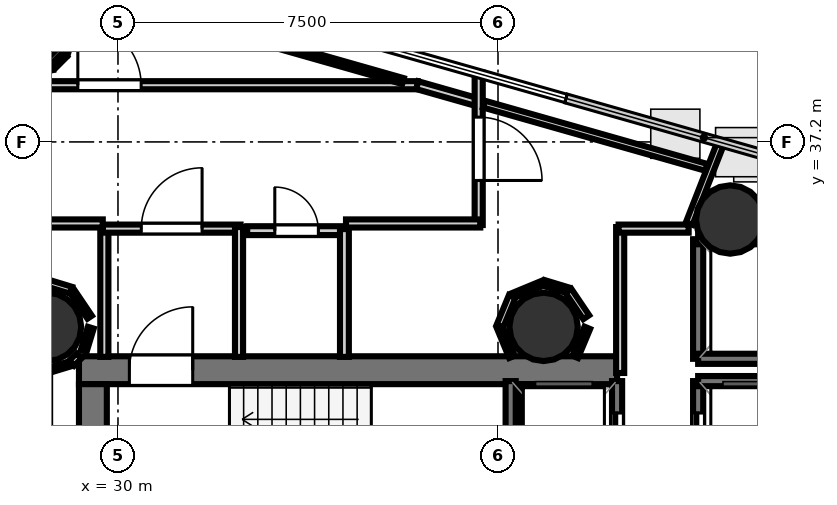
"""IFC4 building model, lengths in metres.
Left out: names, types, materials, properties, quantities, classifications, styles, units other than length and angle.
Written with IfcOpenShell. Run it as: python <this file> out.ifc"""

import sys

from ifc_helpers import new_model, si_unit, direction, frame, frame_2d, origin, origin_2d, place, context, subcontext, project, spatial, rectangle, hollow_circle, extrude, element, fill, save


model = new_model("IFC4")
c1 = context("Model", 3, precision=1e-05, world=origin(), true_north=direction((0.0, 1.0)))
c2 = subcontext(c1, "Body", "Model", "MODEL_VIEW")
j1 = project(units=[si_unit("LENGTHUNIT", "METRE"), si_unit("PLANEANGLEUNIT", "RADIAN")], contexts=[c1])
p1 = place(None, origin())
s1 = spatial("IfcSite", under=j1, at=p1, CompositionType="ELEMENT")
p2 = place(p1, origin())
s2 = spatial("IfcBuilding", under=s1, at=p2, CompositionType="ELEMENT")
p3 = place(p2, frame((0.0, 0.0, 180.9)))
s3 = spatial("IfcBuildingStorey", under=s2, at=p3, CompositionType="ELEMENT", Elevation=180.9)
p4 = place(p3, frame((29.23, 32.695, 0.0), z_axis=(0.0, 0.0, 1.0), x_axis=(1.0, 0.0, 0.0)))
e1 = element("IfcWall", 1, at=p4, inside=s3, PredefinedType="SHEAR", context=c2, shape_type="SweptSolid", body=[
    extrude(rectangle(XDim=10.62, YDim=0.55, at=frame_2d((5.31, 0.0))), origin(), (0.0, 0.0, 1.0), 3.4),
])
p5 = place(p4, frame((0.995, 0.0, 0.0)))
e2 = element("IfcOpeningElement", 2, at=p5, cuts=e1, PredefinedType="OPENING", context=c2, shape_type="SweptSolid", body=[
    extrude(rectangle(XDim=1.25, YDim=2.15, at=frame_2d((0.625, 1.075))), frame((0.0, 0.285, 0.0), z_axis=(0.0, -1.0, 0.0), x_axis=(1.0, 0.0, 0.0)), (0.0, 0.0, 1.0), 0.57),
])
p6 = place(p3, frame((29.505, 24.98, 0.0), z_axis=(0.0, 0.0, 1.0), x_axis=(0.0, 1.0, 0.0)))
e3 = element("IfcWall", 3, at=p6, inside=s3, PredefinedType="SHEAR", context=c2, shape_type="SweptSolid", body=[
    extrude(rectangle(XDim=7.44, YDim=0.55, at=frame_2d((3.72, 0.0))), origin(), (0.0, 0.0, 1.0), 3.4),
])
p7 = place(p3, frame((38.18, 24.98, 0.0), z_axis=(0.0, 0.0, 1.0), x_axis=(0.0, 1.0, 0.0)))
e4 = element("IfcWall", 4, at=p7, inside=s3, PredefinedType="SHEAR", context=c2, shape_type="SweptSolid", body=[
    extrude(rectangle(XDim=7.44, YDim=0.5, at=frame_2d((3.72, 0.0))), origin(), (0.0, 0.0, 1.0), 3.4),
])
for number, where, z_axis, x_axis in (
    (5, (28.6, 33.55, 0.0), (0.0, 0.0, 1.0), (1.0, 0.0, 0.0)),
    (6, (38.4, 33.55, 0.0), (0.0, 0.0, 1.0), (1.0, 0.0, 0.0)),
    (7, (42.083, 35.669, 0.0), (0.0, 0.0, 1.0), (1.0, 0.0, 0.0)),
    (8, (28.235, 39.411, 0.0), (0.0, 0.0, 1.0), (1.0, 0.0, 0.0)),
):
    element("IfcColumn", number, at=place(p3, frame(where, z_axis=z_axis, x_axis=x_axis)), inside=s3, PredefinedType="COLUMN", context=c2, shape_type="SweptSolid", body=[
        extrude(hollow_circle(Radius=0.675, WallThickness=0.032, at=origin_2d()), origin(), (0.0, 0.0, 1.0), 3.7),
    ])
p8 = place(p3, frame((39.85, 30.12, 0.0), z_axis=(0.0, 0.0, 1.0), x_axis=(0.0, 1.0, 0.0)))
e9 = element("IfcWall", 9, at=p8, inside=s3, PredefinedType="SOLIDWALL", context=c2, shape_type="SweptSolid", body=[
    extrude(rectangle(XDim=2.36, YDim=0.2, at=frame_2d((1.18, 0.0))), origin(), (0.0, 0.0, 1.0), 3.4),
])
p9 = place(p8, frame((0.63, 0.0, 0.0)))
e10 = element("IfcOpeningElement", 10, at=p9, cuts=e9, PredefinedType="OPENING", context=c2, shape_type="SweptSolid", body=[
    extrude(rectangle(XDim=1.1, YDim=2.15, at=frame_2d((0.55, 1.075))), frame((0.0, 0.11, 0.0), z_axis=(0.0, -1.0, 0.0), x_axis=(1.0, 0.0, 0.0)), (0.0, 0.0, 1.0), 0.22),
])
p10 = place(p3, frame((37.75, 30.12, 0.0), z_axis=(0.0, 0.0, 1.0), x_axis=(0.0, 1.0, 0.0)))
e11 = element("IfcWall", 11, at=p10, inside=s3, PredefinedType="SOLIDWALL", context=c2, shape_type="SweptSolid", body=[
    extrude(rectangle(XDim=2.36, YDim=0.2, at=frame_2d((1.18, 0.0))), origin(), (0.0, 0.0, 1.0), 3.4),
])
p11 = place(p3, frame((41.45, 30.12, 0.0), z_axis=(0.0, 0.0, 1.0), x_axis=(0.0, 1.0, 0.0)))
e12 = element("IfcWall", 12, at=p11, inside=s3, PredefinedType="SOLIDWALL", context=c2, shape_type="SweptSolid", body=[
    extrude(rectangle(XDim=2.36, YDim=0.2, at=frame_2d((1.18, 0.0))), origin(), (0.0, 0.0, 1.0), 3.4),
])
p12 = place(p11, frame((0.63, 0.0, 0.0)))
e13 = element("IfcOpeningElement", 13, at=p12, cuts=e12, PredefinedType="OPENING", context=c2, shape_type="SweptSolid", body=[
    extrude(rectangle(XDim=1.1, YDim=2.15, at=frame_2d((0.55, 1.075))), frame((0.0, 0.11, 0.0), z_axis=(0.0, -1.0, 0.0), x_axis=(1.0, 0.0, 0.0)), (0.0, 0.0, 1.0), 0.22),
])
p13 = place(p3, frame((41.45, 32.48, 0.0), z_axis=(0.0, 0.0, 1.0), x_axis=(1.0, 0.0, 0.0)))
e14 = element("IfcWall", 14, at=p13, inside=s3, PredefinedType="SOLIDWALL", context=c2, shape_type="SweptSolid", body=[
    extrude(rectangle(XDim=2.1, YDim=0.2, at=frame_2d((1.05, 0.0))), origin(), (0.0, 0.0, 1.0), 3.4),
])
p14 = place(p3, frame((41.45, 32.92, 0.0), z_axis=(0.0, 0.0, 1.0), x_axis=(0.0, 1.0, 0.0)))
e15 = element("IfcWall", 15, at=p14, inside=s3, PredefinedType="SOLIDWALL", context=c2, shape_type="SweptSolid", body=[
    extrude(rectangle(XDim=2.36, YDim=0.2, at=frame_2d((1.18, 0.0))), origin(), (0.0, 0.0, 1.0), 3.4),
])
for number, where, z_axis, x_axis in (
    (16, (41.45, 35.28, 0.0), (0.0, 0.0, 1.0), (1.0, 0.0, 0.0)),
    (17, (41.45, 32.92, 0.0), (0.0, 0.0, 1.0), (1.0, 0.0, 0.0)),
):
    element("IfcWall", number, at=place(p3, frame(where, z_axis=z_axis, x_axis=x_axis)), inside=s3, PredefinedType="SOLIDWALL", context=c2, shape_type="SweptSolid", body=[
        extrude(rectangle(XDim=2.1, YDim=0.2, at=frame_2d((1.05, 0.0))), origin(), (0.0, 0.0, 1.0), 3.4),
    ])
p15 = place(p3, frame((29.731, 32.958, 0.0), z_axis=(0.0, 0.0, 1.0), x_axis=(0.0, 1.0, 0.0)))
e18 = element("IfcWall", 18, at=p15, inside=s3, PredefinedType="PARTITIONING", context=c2, shape_type="SweptSolid", body=[
    extrude(rectangle(XDim=2.562, YDim=0.16, at=frame_2d((1.281, 0.0))), origin(), (0.0, 0.0, 1.0), 2.72),
])
p16 = place(p3, frame((29.7, 35.489, 0.0), z_axis=(0.0, 0.0, 1.0), x_axis=(1.0, 0.0, 0.0)))
e19 = element("IfcWall", 19, at=p16, inside=s3, PredefinedType="PARTITIONING", context=c2, shape_type="SweptSolid", body=[
    extrude(rectangle(XDim=2.72, YDim=0.16, at=frame_2d((1.36, 0.0))), origin(), (0.0, 0.0, 1.0), 2.72),
])
p17 = place(p16, frame((0.76, 0.0, 0.0)))
e20 = element("IfcOpeningElement", 20, at=p17, cuts=e19, PredefinedType="OPENING", context=c2, shape_type="SweptSolid", body=[
    extrude(rectangle(XDim=1.2, YDim=2.15, at=frame_2d((0.6, 1.075))), frame((0.0, 0.09, 0.0), z_axis=(0.0, -1.0, 0.0), x_axis=(1.0, 0.0, 0.0)), (0.0, 0.0, 1.0), 0.18),
])
p18 = place(p3, frame((32.389, 35.52, 0.0), z_axis=(0.0, 0.0, 1.0), x_axis=(0.0, -1.0, 0.0)))
e21 = element("IfcWall", 21, at=p18, inside=s3, PredefinedType="PARTITIONING", context=c2, shape_type="SweptSolid", body=[
    extrude(rectangle(XDim=2.562, YDim=0.16, at=frame_2d((1.281, 0.0))), origin(), (0.0, 0.0, 1.0), 2.72),
])
p19 = place(p3, frame((39.911, 32.64, 0.0), z_axis=(0.0, 0.0, 1.0), x_axis=(0.0, 1.0, 0.0)))
e22 = element("IfcWall", 22, at=p19, inside=s3, PredefinedType="PARTITIONING", context=c2, shape_type="SweptSolid", body=[
    extrude(rectangle(XDim=2.88, YDim=0.16, at=frame_2d((1.44, 0.0))), origin(), (0.0, 0.0, 1.0), 2.72),
])
p20 = place(p3, frame((39.88, 35.489, 0.0), z_axis=(0.0, 0.0, 1.0), x_axis=(1.0, 0.0, 0.0)))
e23 = element("IfcWall", 23, at=p20, inside=s3, PredefinedType="PARTITIONING", context=c2, shape_type="SweptSolid", body=[
    extrude(rectangle(XDim=1.383, YDim=0.16, at=frame_2d((0.691, 0.0))), origin(), (0.0, 0.0, 1.0), 2.72),
])
p21 = place(p3, frame((32.55, 35.449, 0.0), z_axis=(0.0, 0.0, 1.0), x_axis=(1.0, 0.0, 0.0)))
e24 = element("IfcWall", 24, at=p21, inside=s3, PredefinedType="PLUMBINGWALL", context=c2, shape_type="SweptSolid", body=[
    extrude(rectangle(XDim=1.95, YDim=0.175, at=frame_2d((0.975, 0.0))), origin(), (0.0, 0.0, 1.0), 2.72),
])
p22 = place(p21, frame((0.545, 0.0, 0.0)))
e25 = element("IfcOpeningElement", 25, at=p22, cuts=e24, PredefinedType="OPENING", context=c2, shape_type="SweptSolid", body=[
    extrude(rectangle(XDim=0.86, YDim=2.05, at=frame_2d((0.43, 1.025))), frame((0.0, 0.097, 0.0), z_axis=(0.0, -1.0, 0.0), x_axis=(1.0, 0.0, 0.0)), (0.0, 0.0, 1.0), 0.195),
])
p23 = place(p3, frame((34.469, 35.48, 0.0), z_axis=(0.0, 0.0, 1.0), x_axis=(0.0, -1.0, 0.0)))
e26 = element("IfcWall", 26, at=p23, inside=s3, PredefinedType="PLUMBINGWALL", context=c2, shape_type="SweptSolid", body=[
    extrude(rectangle(XDim=2.522, YDim=0.175, at=frame_2d((1.261, 0.0))), origin(), (0.0, 0.0, 1.0), 2.72),
])
p24 = place(p3, frame((23.75, 38.319, 0.0), z_axis=(0.0, 0.0, 1.0), x_axis=(1.0, 0.0, 0.0)))
e27 = element("IfcWall", 27, at=p24, inside=s3, PredefinedType="PARTITIONING", context=c2, shape_type="SweptSolid", body=[
    extrude(rectangle(XDim=12.165, YDim=0.16, at=frame_2d((6.083, 0.0))), origin(), (0.0, 0.0, 1.0), 2.72),
])
p25 = place(p24, frame((5.458, 0.0, 0.0)))
e28 = element("IfcOpeningElement", 28, at=p25, cuts=e27, PredefinedType="OPENING", context=c2, shape_type="SweptSolid", body=[
    extrude(rectangle(XDim=1.25, YDim=2.2, at=frame_2d((0.625, 1.1))), frame((0.0, 0.09, 0.0), z_axis=(0.0, -1.0, 0.0), x_axis=(1.0, 0.0, 0.0)), (0.0, 0.0, 1.0), 0.18),
])
p26 = place(p3, frame((35.907, 38.32, 0.0), z_axis=(0.0, 0.0, 1.0), x_axis=(0.96183190349, -0.273640986382, 0.0)))
e29 = element("IfcWall", 29, at=p26, inside=s3, PredefinedType="PARTITIONING", context=c2, shape_type="SweptSolid", body=[
    extrude(rectangle(XDim=1.284, YDim=0.16, at=frame_2d((0.642, 0.0))), origin(), (0.0, 0.0, 1.0), 2.72),
])
p27 = place(p3, frame((37.119, 38.568, 0.0), z_axis=(0.0, 0.0, 1.0), x_axis=(0.0, -1.0, 0.0)))
e30 = element("IfcWall", 30, at=p27, inside=s3, PredefinedType="PARTITIONING", context=c2, shape_type="SweptSolid", body=[
    extrude(rectangle(XDim=3.008, YDim=0.16, at=frame_2d((1.504, 0.0))), origin(), (0.0, 0.0, 1.0), 2.72),
])
p28 = place(p27, frame((0.879, 0.0, 0.0)))
e31 = element("IfcOpeningElement", 31, at=p28, cuts=e30, PredefinedType="OPENING", context=c2, shape_type="SweptSolid", body=[
    extrude(rectangle(XDim=1.25, YDim=2.2, at=frame_2d((0.625, 1.1))), frame((0.0, 0.09, 0.0), z_axis=(0.0, -1.0, 0.0), x_axis=(1.0, 0.0, 0.0)), (0.0, 0.0, 1.0), 0.18),
])
p29 = place(p3, frame((37.15, 35.591, 0.0), z_axis=(0.0, 0.0, 1.0), x_axis=(-1.0, 0.0, 0.0)))
e32 = element("IfcWall", 32, at=p29, inside=s3, PredefinedType="PARTITIONING", context=c2, shape_type="SweptSolid", body=[
    extrude(rectangle(XDim=2.65, YDim=0.16, at=frame_2d((1.325, 0.0))), origin(), (0.0, 0.0, 1.0), 2.72),
])
p30 = place(p3, frame((29.7, 35.591, 0.0), z_axis=(0.0, 0.0, 1.0), x_axis=(-1.0, 0.0, 0.0)))
e33 = element("IfcWall", 33, at=p30, inside=s3, PredefinedType="PARTITIONING", context=c2, shape_type="SweptSolid", body=[
    extrude(rectangle(XDim=3.12, YDim=0.16, at=frame_2d((1.56, 0.0))), origin(), (0.0, 0.0, 1.0), 2.72),
])
p31 = place(p3, frame((41.273, 35.589, 0.0), z_axis=(0.0, 0.0, 1.0), x_axis=(0.364552894348, 0.931182681981, 0.0)))
e34 = element("IfcWall", 34, at=p31, inside=s3, PredefinedType="PARTITIONING", context=c2, shape_type="SweptSolid", body=[
    extrude(rectangle(XDim=1.739, YDim=0.14, at=frame_2d((0.869, 0.0))), origin(), (0.0, 0.0, 1.0), 2.72),
])
p32 = place(p3, frame((39.241, 33.741, 0.0), z_axis=(0.0, 0.0, 1.0), x_axis=(-0.559619584068, 0.828749613048, 0.0)))
e35 = element("IfcWall", 35, at=p32, inside=s3, PredefinedType="PARTITIONING", context=c2, shape_type="SweptSolid", body=[
    extrude(rectangle(XDim=0.629, YDim=0.14, at=frame_2d((0.314, 0.0))), origin(), (0.0, 0.0, 1.0), 2.72),
])
p33 = place(p3, frame((38.873, 34.274, 0.0), z_axis=(0.0, 0.0, 1.0), x_axis=(-0.956850575764, 0.290580411693, 0.0)))
e36 = element("IfcWall", 36, at=p33, inside=s3, PredefinedType="PARTITIONING", context=c2, shape_type="SweptSolid", body=[
    extrude(rectangle(XDim=0.485, YDim=0.12, at=frame_2d((0.242, 0.0))), origin(), (0.0, 0.0, 1.0), 2.72),
])
p34 = place(p3, frame((38.388, 34.414, 0.0), z_axis=(0.0, 0.0, 1.0), x_axis=(-0.924012178777, -0.382363038841, 0.0)))
e37 = element("IfcWall", 37, at=p34, inside=s3, PredefinedType="PARTITIONING", context=c2, shape_type="SweptSolid", body=[
    extrude(rectangle(XDim=0.639, YDim=0.105, at=frame_2d((0.32, 0.0))), origin(), (0.0, 0.0, 1.0), 2.72),
])
p35 = place(p3, frame((37.781, 34.152, 0.0), z_axis=(0.0, 0.0, 1.0), x_axis=(-0.382824178437, -0.923821221018, 0.0)))
e38 = element("IfcWall", 38, at=p35, inside=s3, PredefinedType="PARTITIONING", context=c2, shape_type="SweptSolid", body=[
    extrude(rectangle(XDim=0.639, YDim=0.14, at=frame_2d((0.319, 0.0))), origin(), (0.0, 0.0, 1.0), 2.72),
])
p36 = place(p3, frame((37.536, 33.538, 0.0), z_axis=(0.0, 0.0, 1.0), x_axis=(0.382626535499, -0.923903097912, 0.0)))
e39 = element("IfcWall", 39, at=p36, inside=s3, PredefinedType="PARTITIONING", context=c2, shape_type="SweptSolid", body=[
    extrude(rectangle(XDim=0.628, YDim=0.12, at=frame_2d((0.314, 0.0))), origin(), (0.0, 0.0, 1.0), 2.72),
])
p37 = place(p3, frame((39.023, 32.958, 0.0), z_axis=(0.0, 0.0, 1.0), x_axis=(0.385702795868, 0.922623082987, 0.0)))
e40 = element("IfcWall", 40, at=p37, inside=s3, PredefinedType="PARTITIONING", context=c2, shape_type="SweptSolid", body=[
    extrude(rectangle(XDim=0.622, YDim=0.12, at=frame_2d((0.311, 0.0))), origin(), (0.0, 0.0, 1.0), 2.72),
])
p38 = place(p3, frame((37.221, 37.946, 0.0), z_axis=(0.0, 0.0, 1.0), x_axis=(0.961870441874, -0.27350548998, 0.0)))
e41 = element("IfcWall", 41, at=p38, inside=s3, PredefinedType="PARTITIONING", context=c2, shape_type="SweptSolid", body=[
    extrude(rectangle(XDim=4.563, YDim=0.14, at=frame_2d((2.282, 0.0))), origin(), (0.0, 0.0, 1.0), 2.72),
])
p39 = place(p3, frame((28.078, 38.562, 0.0), z_axis=(0.0, 0.0, 1.0), x_axis=(0.98075661624, 0.195234371211, 0.0)))
e42 = element("IfcWall", 42, at=p39, inside=s3, PredefinedType="PARTITIONING", context=c2, shape_type="SweptSolid", body=[
    extrude(rectangle(XDim=0.639, YDim=0.14, at=frame_2d((0.319, 0.0))), origin(), (0.0, 0.0, 1.0), 2.72),
])
p40 = place(p3, frame((28.721, 38.695, 0.0), z_axis=(0.0, 0.0, 1.0), x_axis=(0.707106781187, 0.707106781187, 0.0)))
e43 = element("IfcWall", 43, at=p40, inside=s3, PredefinedType="PARTITIONING", context=c2, shape_type="SweptSolid", body=[
    extrude(rectangle(XDim=0.326, YDim=0.12, at=frame_2d((0.163, 0.0))), origin(), (0.0, 0.0, 1.0), 2.72),
])
p41 = place(p3, frame((28.959, 38.938, 0.0), z_axis=(0.0, 0.0, 1.0), x_axis=(0.292866596221, 0.956153312402, 0.0)))
e44 = element("IfcWall", 44, at=p41, inside=s3, PredefinedType="PARTITIONING", context=c2, shape_type="SweptSolid", body=[
    extrude(rectangle(XDim=0.479, YDim=0.105, at=frame_2d((0.239, 0.0))), origin(), (0.0, 0.0, 1.0), 2.72),
])
p42 = place(p3, frame((32.171, 39.383, 0.0), z_axis=(0.0, 0.0, 1.0), x_axis=(0.96186181525, -0.273535826471, 0.0)))
e45 = element("IfcWall", 45, at=p42, inside=s3, PredefinedType="PARTITIONING", context=c2, shape_type="SweptSolid", body=[
    extrude(rectangle(XDim=3.592, YDim=0.12, at=frame_2d((1.796, 0.0))), origin(), (0.0, 0.0, 1.0), 2.72),
])
p43 = place(p3, frame((29.441, 33.741, 0.0), z_axis=(0.0, 0.0, 1.0), x_axis=(-0.559619584068, 0.828749613048, 0.0)))
e46 = element("IfcWall", 46, at=p43, inside=s3, PredefinedType="PARTITIONING", context=c2, shape_type="SweptSolid", body=[
    extrude(rectangle(XDim=0.629, YDim=0.105, at=frame_2d((0.314, 0.0))), origin(), (0.0, 0.0, 1.0), 2.72),
])
p44 = place(p3, frame((29.073, 34.274, 0.0), z_axis=(0.0, 0.0, 1.0), x_axis=(-0.956893067978, 0.290440452511, 0.0)))
e47 = element("IfcWall", 47, at=p44, inside=s3, PredefinedType="PARTITIONING", context=c2, shape_type="SweptSolid", body=[
    extrude(rectangle(XDim=0.485, YDim=0.14, at=frame_2d((0.243, 0.0))), origin(), (0.0, 0.0, 1.0), 2.72),
])
p45 = place(p3, frame((28.609, 32.685, 0.0), z_axis=(0.0, 0.0, 1.0), x_axis=(0.956893067978, 0.290440452511, 0.0)))
e48 = element("IfcWall", 48, at=p45, inside=s3, PredefinedType="PARTITIONING", context=c2, shape_type="SweptSolid", body=[
    extrude(rectangle(XDim=0.485, YDim=0.105, at=frame_2d((0.243, 0.0))), origin(), (0.0, 0.0, 1.0), 2.72),
])
p46 = place(p3, frame((29.086, 32.834, 0.0), z_axis=(0.0, 0.0, 1.0), x_axis=(0.707106781187, 0.707106781187, 0.0)))
e49 = element("IfcWall", 49, at=p46, inside=s3, PredefinedType="PARTITIONING", context=c2, shape_type="SweptSolid", body=[
    extrude(rectangle(XDim=0.204, YDim=0.14, at=frame_2d((0.102, 0.0))), origin(), (0.0, 0.0, 1.0), 2.72),
])
p47 = place(p3, frame((29.324, 33.077, 0.0), z_axis=(0.0, 0.0, 1.0), x_axis=(0.292866596221, 0.956153312402, 0.0)))
e50 = element("IfcWall", 50, at=p47, inside=s3, PredefinedType="PARTITIONING", context=c2, shape_type="SweptSolid", body=[
    extrude(rectangle(XDim=0.479, YDim=0.12, at=frame_2d((0.239, 0.0))), origin(), (0.0, 0.0, 1.0), 2.72),
])
p48 = place(p5, origin())
e51 = element("IfcDoor", 51, at=p48, inside=s3, OperationType="SINGLE_SWING_RIGHT", PredefinedType="DOOR", context=c2, shape_type="SweptSolid", body=[
    extrude(rectangle(XDim=1.25, YDim=2.15, at=frame_2d((0.625, 1.075))), frame((0.0, 0.025, 0.0), z_axis=(0.0, -1.0, 0.0), x_axis=(1.0, 0.0, 0.0)), (0.0, 0.0, 1.0), 0.05),
])
fill(e2, e51)
p49 = place(p9, origin())
e52 = element("IfcDoor", 52, at=p49, inside=s3, OperationType="SLIDING_TO_LEFT", PredefinedType="DOOR", context=c2, shape_type="SweptSolid", body=[
    extrude(rectangle(XDim=1.1, YDim=2.15, at=frame_2d((0.55, 1.075))), frame((0.0, 0.025, 0.0), z_axis=(0.0, -1.0, 0.0), x_axis=(1.0, 0.0, 0.0)), (0.0, 0.0, 1.0), 0.05),
])
fill(e10, e52)
p50 = place(p12, origin())
e53 = element("IfcDoor", 53, at=p50, inside=s3, OperationType="SLIDING_TO_LEFT", PredefinedType="DOOR", context=c2, shape_type="SweptSolid", body=[
    extrude(rectangle(XDim=1.1, YDim=2.15, at=frame_2d((0.55, 1.075))), frame((0.0, 0.025, 0.0), z_axis=(0.0, -1.0, 0.0), x_axis=(1.0, 0.0, 0.0)), (0.0, 0.0, 1.0), 0.05),
])
fill(e13, e53)
p51 = place(p17, origin())
e54 = element("IfcDoor", 54, at=p51, inside=s3, OperationType="SINGLE_SWING_RIGHT", PredefinedType="DOOR", context=c2, shape_type="SweptSolid", body=[
    extrude(rectangle(XDim=1.2, YDim=2.15, at=frame_2d((0.6, 1.075))), frame((0.0, 0.025, 0.0), z_axis=(0.0, -1.0, 0.0), x_axis=(1.0, 0.0, 0.0)), (0.0, 0.0, 1.0), 0.05),
])
fill(e20, e54)
p52 = place(p22, origin())
e55 = element("IfcDoor", 55, at=p52, inside=s3, OperationType="SINGLE_SWING_LEFT", PredefinedType="DOOR", context=c2, shape_type="SweptSolid", body=[
    extrude(rectangle(XDim=0.86, YDim=2.05, at=frame_2d((0.43, 1.025))), frame((0.0, 0.025, 0.0), z_axis=(0.0, -1.0, 0.0), x_axis=(1.0, 0.0, 0.0)), (0.0, 0.0, 1.0), 0.05),
])
fill(e25, e55)
p53 = place(p28, origin())
e56 = element("IfcDoor", 56, at=p53, inside=s3, OperationType="SINGLE_SWING_RIGHT", PredefinedType="DOOR", context=c2, shape_type="SweptSolid", body=[
    extrude(rectangle(XDim=1.25, YDim=2.2, at=frame_2d((0.625, 1.1))), frame((0.0, 0.025, 0.0), z_axis=(0.0, -1.0, 0.0), x_axis=(1.0, 0.0, 0.0)), (0.0, 0.0, 1.0), 0.05),
])
fill(e31, e56)
p54 = place(p25, origin())
e57 = element("IfcDoor", 57, at=p54, inside=s3, OperationType="SINGLE_SWING_LEFT", PredefinedType="DOOR", context=c2, shape_type="SweptSolid", body=[
    extrude(rectangle(XDim=1.25, YDim=2.2, at=frame_2d((0.625, 1.1))), frame((0.0, 0.025, 0.0), z_axis=(0.0, -1.0, 0.0), x_axis=(1.0, 0.0, 0.0)), (0.0, 0.0, 1.0), 0.05),
])
fill(e28, e57)
save(model, sys.argv[1])
